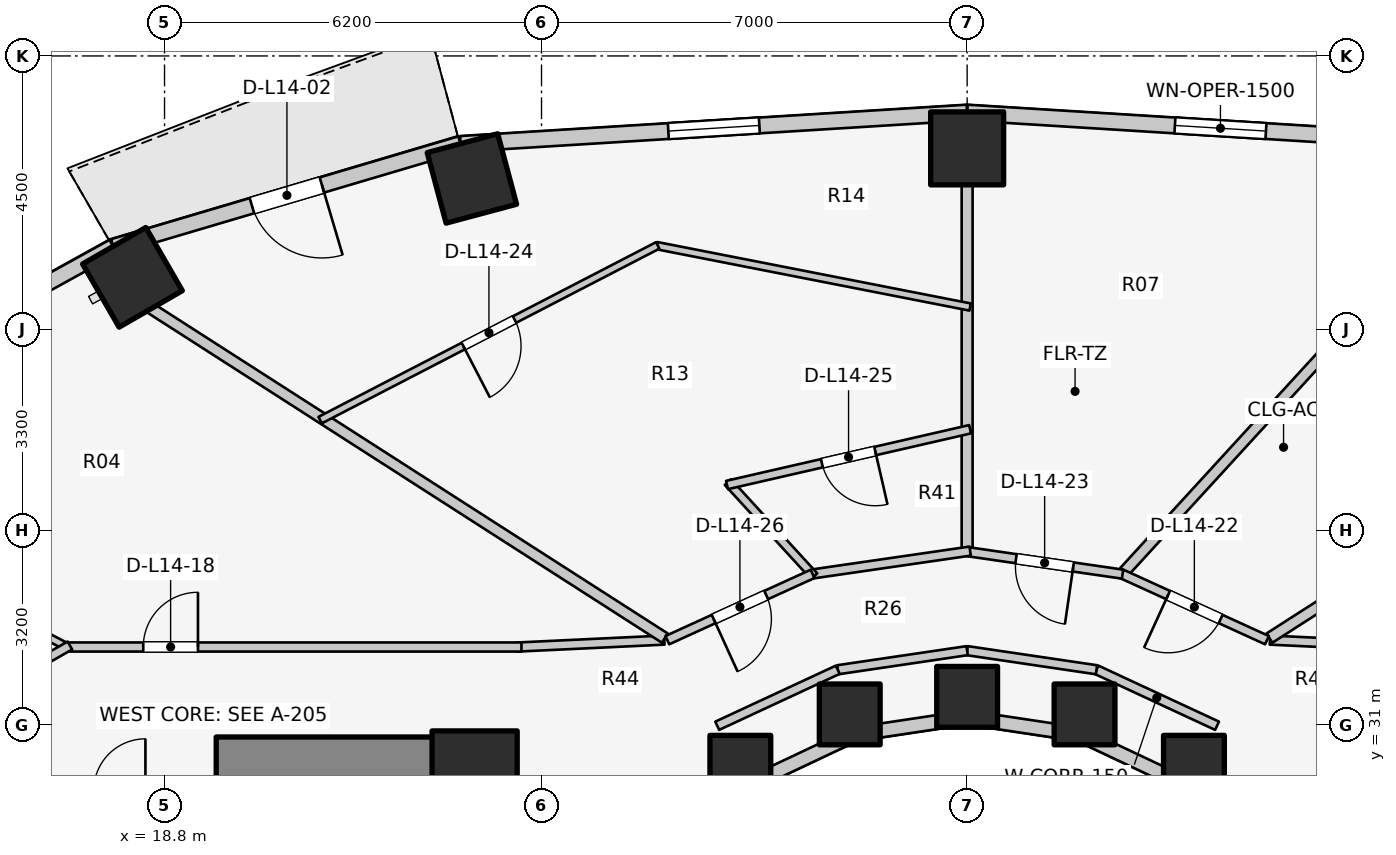
"""IFC4 building model, lengths in metres.
Left out: names, types, materials, properties, quantities, classifications, styles, units other than length and angle.
Written with IfcOpenShell. Run it as: python <this file> out.ifc"""

import sys

from ifc_helpers import new_model, si_unit, direction, frame, frame_2d, origin, origin_2d, place, context, subcontext, project, spatial, rectangle, extrude, element, fill, save


model = new_model("IFC4")
c1 = context("Model", 3, precision=1e-05, world=origin(), true_north=direction((0.0, 1.0)))
c2 = subcontext(c1, "Body", "Model", "MODEL_VIEW")
j1 = project(units=[si_unit("LENGTHUNIT", "METRE"), si_unit("PLANEANGLEUNIT", "RADIAN")], contexts=[c1])
p1 = place(None, origin())
s1 = spatial("IfcSite", under=j1, at=p1, CompositionType="ELEMENT")
p2 = place(p1, origin())
s2 = spatial("IfcBuilding", under=s1, at=p2, CompositionType="ELEMENT")
p3 = place(p2, frame((0.0, 0.0, 49.3)))
s3 = spatial("IfcBuildingStorey", under=s2, at=p3, CompositionType="ELEMENT", Elevation=49.3)
p4 = place(p3, frame((19.65, 30.35, 0.0), z_axis=(0.0, 0.0, 1.0), x_axis=(1.0, 0.0, 0.0)))
e1 = element("IfcWall", 1, at=p4, inside=s3, PredefinedType="SHEAR", context=c2, shape_type="SweptSolid", body=[
    extrude(rectangle(XDim=4.5, YDim=0.9, at=frame_2d((2.25, 0.0))), origin(), (0.0, 0.0, 1.0), 3.1),
])
p5 = place(p3, frame((23.9, 30.2, 0.0), z_axis=(0.0, 0.0, 1.0), x_axis=(1.0, 0.0, 0.0)))
e2 = element("IfcColumn", 2, at=p5, inside=s3, PredefinedType="COLUMN", context=c2, shape_type="SweptSolid", body=[
    extrude(rectangle(XDim=1.4, YDim=1.4, at=origin_2d()), origin(), (0.0, 0.0, 1.0), 3.1),
])
for number, where, z_axis, x_axis in (
    (3, (35.73, 30.327, 0.0), (0.0, 0.0, 1.0), (1.0, 0.0, 0.0)),
    (4, (33.931, 31.172, 0.0), (0.0, 0.0, 1.0), (1.0, 0.0, 0.0)),
    (5, (32.0, 31.46, 0.0), (0.0, 0.0, 1.0), (1.0, 0.0, 0.0)),
):
    element("IfcColumn", number, at=place(p3, frame(where, z_axis=z_axis, x_axis=x_axis)), inside=s3, PredefinedType="COLUMN", context=c2, shape_type="SweptSolid", body=[
        extrude(rectangle(XDim=1.0, YDim=1.0, at=origin_2d()), origin(), (0.0, 0.0, 1.0), 3.1),
    ])
p6 = place(p3, frame((32.0, 40.48, 0.0), z_axis=(0.0, 0.0, 1.0), x_axis=(0.0, 1.0, 0.0)))
e6 = element("IfcColumn", 6, at=p6, inside=s3, PredefinedType="COLUMN", context=c2, shape_type="SweptSolid", body=[
    extrude(rectangle(XDim=1.2, YDim=1.2, at=origin_2d()), origin(), (0.0, 0.0, 1.0), 3.1),
])
p7 = place(p3, frame((30.069, 31.172, 0.0), z_axis=(0.0, 0.0, 1.0), x_axis=(1.0, 0.0, 0.0)))
e7 = element("IfcColumn", 7, at=p7, inside=s3, PredefinedType="COLUMN", context=c2, shape_type="SweptSolid", body=[
    extrude(rectangle(XDim=1.0, YDim=1.0, at=origin_2d()), origin(), (0.0, 0.0, 1.0), 3.1),
])
p8 = place(p3, frame((23.855, 39.986, 0.0), z_axis=(0.0, 0.0, 1.0), x_axis=(-0.258819045103, 0.965925826289, 0.0)))
e8 = element("IfcColumn", 8, at=p8, inside=s3, PredefinedType="COLUMN", context=c2, shape_type="SweptSolid", body=[
    extrude(rectangle(XDim=1.2, YDim=1.2, at=origin_2d()), origin(), (0.0, 0.0, 1.0), 3.1),
])
p9 = place(p3, frame((28.27, 30.327, 0.0), z_axis=(0.0, 0.0, 1.0), x_axis=(1.0, 0.0, 0.0)))
e9 = element("IfcColumn", 9, at=p9, inside=s3, PredefinedType="COLUMN", context=c2, shape_type="SweptSolid", body=[
    extrude(rectangle(XDim=1.0, YDim=1.0, at=origin_2d()), origin(), (0.0, 0.0, 1.0), 3.1),
])
p10 = place(p3, frame((18.273, 38.359, 0.0), z_axis=(0.0, 0.0, 1.0), x_axis=(-0.5, 0.866025403784, 0.0)))
e10 = element("IfcColumn", 10, at=p10, inside=s3, PredefinedType="COLUMN", context=c2, shape_type="SweptSolid", body=[
    extrude(rectangle(XDim=1.2, YDim=1.2, at=origin_2d()), origin(), (0.0, 0.0, 1.0), 3.1),
])
p11 = place(p3, frame((35.56, 30.032, 0.0), z_axis=(0.0, 0.0, 1.0), x_axis=(-0.904179699603, 0.427152280606, 0.0)))
e11 = element("IfcWall", 11, at=p11, inside=s3, PredefinedType="STANDARD", context=c2, shape_type="SweptSolid", body=[
    extrude(rectangle(XDim=1.899, YDim=0.23, at=frame_2d((0.95, 0.0))), origin(), (0.0, 0.0, 1.0), 2.16),
])
for number, where, z_axis, x_axis in (
    (12, (33.843, 30.843, 0.0), (0.0, 0.0, 1.0), (-0.989, 0.149, 0.0)),
    (13, (32.0, 31.12, 0.0), (0.0, 0.0, 1.0), (-0.989, -0.149, 0.0)),
):
    element("IfcWall", number, at=place(p3, frame(where, z_axis=z_axis, x_axis=x_axis)), inside=s3, PredefinedType="STANDARD", context=c2, shape_type="SweptSolid", body=[
        extrude(rectangle(XDim=1.864, YDim=0.23, at=frame_2d((0.932, 0.0))), origin(), (0.0, 0.0, 1.0), 2.16),
    ])
p12 = place(p3, frame((30.157, 30.843, 0.0), z_axis=(0.0, 0.0, 1.0), x_axis=(-0.904179699603, -0.427152280606, 0.0)))
e14 = element("IfcWall", 14, at=p12, inside=s3, PredefinedType="STANDARD", context=c2, shape_type="SweptSolid", body=[
    extrude(rectangle(XDim=1.899, YDim=0.23, at=frame_2d((0.95, 0.0))), origin(), (0.0, 0.0, 1.0), 2.16),
])
p13 = place(p3, frame((40.332, 40.553, 0.0), z_axis=(0.0, 0.0, 1.0), x_axis=(-0.998090514779, 0.061768311519, 0.0)))
e15 = element("IfcWall", 15, at=p13, inside=s3, PredefinedType="STANDARD", context=c2, shape_type="SweptSolid", body=[
    extrude(rectangle(XDim=8.348, YDim=0.26, at=frame_2d((4.174, 0.0))), origin(), (0.0, 0.0, 1.0), 2.85),
])
p14 = place(p13, frame((3.424, 0.0, 0.75)))
e16 = element("IfcOpeningElement", 16, at=p14, cuts=e15, PredefinedType="OPENING", context=c2, shape_type="SweptSolid", body=[
    extrude(rectangle(XDim=1.5, YDim=1.6, at=frame_2d((0.75, 0.8))), frame((0.0, 0.14, 0.0), z_axis=(0.0, -1.0, 0.0), x_axis=(1.0, 0.0, 0.0)), (0.0, 0.0, 1.0), 0.28),
])
p15 = place(p3, frame((32.0, 41.069, 0.0), z_axis=(0.0, 0.0, 1.0), x_axis=(-0.998090514779, -0.061768311519, 0.0)))
e17 = element("IfcWall", 17, at=p15, inside=s3, PredefinedType="STANDARD", context=c2, shape_type="SweptSolid", body=[
    extrude(rectangle(XDim=8.348, YDim=0.26, at=frame_2d((4.174, 0.0))), origin(), (0.0, 0.0, 1.0), 2.85),
])
p16 = place(p15, frame((3.424, 0.0, 0.75)))
e18 = element("IfcOpeningElement", 18, at=p16, cuts=e17, PredefinedType="OPENING", context=c2, shape_type="SweptSolid", body=[
    extrude(rectangle(XDim=1.5, YDim=1.6, at=frame_2d((0.75, 0.8))), frame((0.0, 0.14, 0.0), z_axis=(0.0, -1.0, 0.0), x_axis=(1.0, 0.0, 0.0)), (0.0, 0.0, 1.0), 0.28),
])
p17 = place(p3, frame((23.668, 40.553, 0.0), z_axis=(0.0, 0.0, 1.0), x_axis=(-0.958843593522, -0.283934786811, 0.0)))
e19 = element("IfcWall", 19, at=p17, inside=s3, PredefinedType="STANDARD", context=c2, shape_type="SweptSolid", body=[
    extrude(rectangle(XDim=5.955, YDim=0.26, at=frame_2d((2.978, 0.0))), origin(), (0.0, 0.0, 1.0), 2.88),
])
p18 = place(p17, frame((2.378, 0.0, 0.0)))
e20 = element("IfcOpeningElement", 20, at=p18, cuts=e19, PredefinedType="OPENING", context=c2, shape_type="SweptSolid", body=[
    extrude(rectangle(XDim=1.2, YDim=2.2, at=frame_2d((0.6, 1.1))), frame((0.0, 0.14, 0.0), z_axis=(0.0, -1.0, 0.0), x_axis=(1.0, 0.0, 0.0)), (0.0, 0.0, 1.0), 0.28),
])
p19 = place(p3, frame((17.958, 38.862, 0.0), z_axis=(0.0, 0.0, 1.0), x_axis=(-0.875137303239, -0.483874674352, 0.0)))
e21 = element("IfcWall", 21, at=p19, inside=s3, PredefinedType="STANDARD", context=c2, shape_type="SweptSolid", body=[
    extrude(rectangle(XDim=4.985, YDim=0.26, at=frame_2d((2.493, 0.0))), origin(), (0.0, 0.0, 1.0), 2.85),
])
p20 = place(p3, frame((36.11, 30.985, 0.0), z_axis=(0.0, 0.0, 1.0), x_axis=(-0.906943449489, 0.421252393975, 0.0)))
e22 = element("IfcWall", 22, at=p20, inside=s3, PredefinedType="PARTITIONING", context=c2, shape_type="SweptSolid", body=[
    extrude(rectangle(XDim=2.186, YDim=0.15, at=frame_2d((1.093, 0.0))), origin(), (0.0, 0.0, 1.0), 2.237),
])
for number, where, z_axis, x_axis in (
    (23, (34.127, 31.906, 0.0), (0.0, 0.0, 1.0), (-0.989, 0.146, 0.0)),
    (24, (32.0, 32.22, 0.0), (0.0, 0.0, 1.0), (-0.989, -0.146, 0.0)),
):
    element("IfcWall", number, at=place(p3, frame(where, z_axis=z_axis, x_axis=x_axis)), inside=s3, PredefinedType="PARTITIONING", context=c2, shape_type="SweptSolid", body=[
        extrude(rectangle(XDim=2.151, YDim=0.15, at=frame_2d((1.075, 0.0))), origin(), (0.0, 0.0, 1.0), 2.237),
    ])
p21 = place(p3, frame((29.873, 31.906, 0.0), z_axis=(0.0, 0.0, 1.0), x_axis=(-0.906943449489, -0.421252393975, 0.0)))
e25 = element("IfcWall", 25, at=p21, inside=s3, PredefinedType="PARTITIONING", context=c2, shape_type="SweptSolid", body=[
    extrude(rectangle(XDim=2.186, YDim=0.15, at=frame_2d((1.093, 0.0))), origin(), (0.0, 0.0, 1.0), 2.237),
])
p22 = place(p3, frame((36.98, 32.394, 0.0), z_axis=(0.0, 0.0, 1.0), x_axis=(0.998877427952, -0.047369651964, 0.0)))
e26 = element("IfcWall", 26, at=p22, inside=s3, PredefinedType="PARTITIONING", context=c2, shape_type="SweptSolid", body=[
    extrude(rectangle(XDim=2.433, YDim=0.15, at=frame_2d((1.216, 0.0))), origin(), (0.0, 0.0, 1.0), 2.237),
])
p23 = place(p3, frame((17.244, 32.257, 0.0), z_axis=(0.0, 0.0, 1.0), x_axis=(-0.885586030676, 0.464475383924, 0.0)))
e27 = element("IfcWall", 27, at=p23, inside=s3, PredefinedType="MOVABLE", context=c2, shape_type="SweptSolid", body=[
    extrude(rectangle(XDim=2.376, YDim=0.12, at=frame_2d((1.188, 0.0))), origin(), (0.0, 0.0, 1.0), 2.855),
])
p24 = place(p3, frame((27.02, 32.394, 0.0), z_axis=(0.0, 0.0, 1.0), x_axis=(-0.998877427952, -0.047369651964, 0.0)))
e28 = element("IfcWall", 28, at=p24, inside=s3, PredefinedType="PARTITIONING", context=c2, shape_type="SweptSolid", body=[
    extrude(rectangle(XDim=2.433, YDim=0.15, at=frame_2d((1.216, 0.0))), origin(), (0.0, 0.0, 1.0), 2.237),
])
p25 = place(p3, frame((17.15, 32.28, 0.0), z_axis=(0.0, 0.0, 1.0), x_axis=(1.0, 0.0, 0.0)))
e29 = element("IfcWall", 29, at=p25, inside=s3, PredefinedType="PARTITIONING", context=c2, shape_type="SweptSolid", body=[
    extrude(rectangle(XDim=7.52, YDim=0.15, at=frame_2d((3.76, 0.0))), origin(), (0.0, 0.0, 1.0), 2.237),
])
p26 = place(p25, frame((1.3, 0.0, 0.0)))
e30 = element("IfcOpeningElement", 30, at=p26, cuts=e29, PredefinedType="OPENING", context=c2, shape_type="SweptSolid", body=[
    extrude(rectangle(XDim=0.9, YDim=2.1, at=frame_2d((0.45, 1.05))), frame((0.0, 0.085, 0.0), z_axis=(0.0, -1.0, 0.0), x_axis=(1.0, 0.0, 0.0)), (0.0, 0.0, 1.0), 0.17),
])
p27 = place(p3, frame((17.243, 32.305, 0.0), z_axis=(0.0, 0.0, 1.0), x_axis=(-0.867991349648, -0.496579315857, 0.0)))
e31 = element("IfcWall", 31, at=p27, inside=s3, PredefinedType="PARTITIONING", context=c2, shape_type="SweptSolid", body=[
    extrude(rectangle(XDim=2.567, YDim=0.15, at=frame_2d((1.283, 0.0))), origin(), (0.0, 0.0, 1.0), 2.069),
])
p28 = place(p3, frame((36.971, 32.426, 0.0), z_axis=(0.0, 0.0, 1.0), x_axis=(0.841689919529, 0.5399611832, 0.0)))
e32 = element("IfcWall", 32, at=p28, inside=s3, PredefinedType="PARTITIONING", context=c2, shape_type="SweptSolid", body=[
    extrude(rectangle(XDim=10.058, YDim=0.18, at=frame_2d((5.029, 0.0))), origin(), (0.0, 0.0, 1.0), 2.237),
])
p29 = place(p3, frame((34.586, 33.521, 0.0), z_axis=(0.0, 0.0, 1.0), x_axis=(0.675465011224, 0.737392038615, 0.0)))
e33 = element("IfcWall", 33, at=p29, inside=s3, PredefinedType="PARTITIONING", context=c2, shape_type="SweptSolid", body=[
    extrude(rectangle(XDim=8.007, YDim=0.18, at=frame_2d((4.003, 0.0))), origin(), (0.0, 0.0, 1.0), 2.237),
])
p30 = place(p3, frame((32.0, 33.905, 0.0), z_axis=(0.0, 0.0, 1.0), x_axis=(0.0, 1.0, 0.0)))
e34 = element("IfcWall", 34, at=p30, inside=s3, PredefinedType="PARTITIONING", context=c2, shape_type="SweptSolid", body=[
    extrude(rectangle(XDim=5.995, YDim=0.18, at=frame_2d((2.998, 0.0))), origin(), (0.0, 0.0, 1.0), 2.237),
])
p31 = place(p3, frame((27.029, 32.426, 0.0), z_axis=(0.0, 0.0, 1.0), x_axis=(-0.841689919529, 0.5399611832, 0.0)))
e35 = element("IfcWall", 35, at=p31, inside=s3, PredefinedType="PARTITIONING", context=c2, shape_type="SweptSolid", body=[
    extrude(rectangle(XDim=10.058, YDim=0.18, at=frame_2d((5.029, 0.0))), origin(), (0.0, 0.0, 1.0), 2.237),
])
p32 = place(p3, frame((36.931, 32.393, 0.0), z_axis=(0.0, 0.0, 1.0), x_axis=(-0.909747571199, 0.415161843982, 0.0)))
e36 = element("IfcWall", 36, at=p32, inside=s3, PredefinedType="PARTITIONING", context=c2, shape_type="SweptSolid", body=[
    extrude(rectangle(XDim=2.625, YDim=0.15, at=frame_2d((1.312, 0.0))), origin(), (0.0, 0.0, 1.0), 2.237),
])
p33 = place(p32, frame((0.838, 0.0, 0.0)))
e37 = element("IfcOpeningElement", 37, at=p33, cuts=e36, PredefinedType="OPENING", context=c2, shape_type="SweptSolid", body=[
    extrude(rectangle(XDim=0.95, YDim=2.1, at=frame_2d((0.475, 1.05))), frame((0.0, 0.085, 0.0), z_axis=(0.0, -1.0, 0.0), x_axis=(1.0, 0.0, 0.0)), (0.0, 0.0, 1.0), 0.17),
])
p34 = place(p3, frame((34.556, 33.478, 0.0), z_axis=(0.0, 0.0, 1.0), x_axis=(-0.989637894688, 0.143585644814, 0.0)))
e38 = element("IfcWall", 38, at=p34, inside=s3, PredefinedType="PARTITIONING", context=c2, shape_type="SweptSolid", body=[
    extrude(rectangle(XDim=2.59, YDim=0.15, at=frame_2d((1.295, 0.0))), origin(), (0.0, 0.0, 1.0), 2.237),
])
p35 = place(p34, frame((0.82, 0.0, 0.0)))
e39 = element("IfcOpeningElement", 39, at=p35, cuts=e38, PredefinedType="OPENING", context=c2, shape_type="SweptSolid", body=[
    extrude(rectangle(XDim=0.95, YDim=2.1, at=frame_2d((0.475, 1.05))), frame((0.0, 0.085, 0.0), z_axis=(0.0, -1.0, 0.0), x_axis=(1.0, 0.0, 0.0)), (0.0, 0.0, 1.0), 0.17),
])
p36 = place(p3, frame((32.049, 37.871, 0.0), z_axis=(0.0, 0.0, 1.0), x_axis=(-0.981343325718, 0.192263561471, 0.0)))
e40 = element("IfcWall", 40, at=p36, inside=s3, PredefinedType="MOVABLE", context=c2, shape_type="SweptSolid", body=[
    extrude(rectangle(XDim=5.255, YDim=0.12, at=frame_2d((2.627, 0.0))), origin(), (0.0, 0.0, 1.0), 2.237),
])
p37 = place(p3, frame((26.911, 38.884, 0.0), z_axis=(0.0, 0.0, 1.0), x_axis=(-0.88815498257, -0.459544042433, 0.0)))
e41 = element("IfcWall", 41, at=p37, inside=s3, PredefinedType="MOVABLE", context=c2, shape_type="SweptSolid", body=[
    extrude(rectangle(XDim=6.251, YDim=0.12, at=frame_2d((3.125, 0.0))), origin(), (0.0, 0.0, 1.0), 2.237),
])
p38 = place(p37, frame((2.65, 0.0, 0.0)))
e42 = element("IfcOpeningElement", 42, at=p38, cuts=e41, PredefinedType="OPENING", context=c2, shape_type="SweptSolid", body=[
    extrude(rectangle(XDim=0.95, YDim=2.1, at=frame_2d((0.475, 1.05))), frame((0.0, 0.07, 0.0), z_axis=(0.0, -1.0, 0.0), x_axis=(1.0, 0.0, 0.0)), (0.0, 0.0, 1.0), 0.14),
])
p39 = place(p3, frame((32.05, 33.857, 0.0), z_axis=(0.0, 0.0, 1.0), x_axis=(-0.989649898776, -0.143502884474, 0.0)))
e43 = element("IfcWall", 43, at=p39, inside=s3, PredefinedType="PARTITIONING", context=c2, shape_type="SweptSolid", body=[
    extrude(rectangle(XDim=2.676, YDim=0.15, at=frame_2d((1.338, 0.0))), origin(), (0.0, 0.0, 1.0), 2.237),
])
p40 = place(p3, frame((29.484, 33.443, 0.0), z_axis=(0.0, 0.0, 1.0), x_axis=(-0.675445566455, 0.737409849918, 0.0)))
e44 = element("IfcWall", 44, at=p40, inside=s3, PredefinedType="PLUMBINGWALL", context=c2, shape_type="SweptSolid", body=[
    extrude(rectangle(XDim=2.1, YDim=0.14, at=frame_2d((1.05, 0.0))), origin(), (0.0, 0.0, 1.0), 2.855),
])
p41 = place(p3, frame((32.049, 35.861, 0.0), z_axis=(0.0, 0.0, 1.0), x_axis=(-0.974672340529, -0.223637717318, 0.0)))
e45 = element("IfcWall", 45, at=p41, inside=s3, PredefinedType="PLUMBINGWALL", context=c2, shape_type="SweptSolid", body=[
    extrude(rectangle(XDim=4.101, YDim=0.14, at=frame_2d((2.051, 0.0))), origin(), (0.0, 0.0, 1.0), 2.237),
])
p42 = place(p41, frame((1.601, 0.0, 0.0)))
e46 = element("IfcOpeningElement", 46, at=p42, cuts=e45, PredefinedType="OPENING", context=c2, shape_type="SweptSolid", body=[
    extrude(rectangle(XDim=0.9, YDim=2.1, at=frame_2d((0.45, 1.05))), frame((0.0, 0.08, 0.0), z_axis=(0.0, -1.0, 0.0), x_axis=(1.0, 0.0, 0.0)), (0.0, 0.0, 1.0), 0.16),
])
p43 = place(p3, frame((29.457, 33.482, 0.0), z_axis=(0.0, 0.0, 1.0), x_axis=(-0.909747571199, -0.415161843982, 0.0)))
e47 = element("IfcWall", 47, at=p43, inside=s3, PredefinedType="PARTITIONING", context=c2, shape_type="SweptSolid", body=[
    extrude(rectangle(XDim=2.625, YDim=0.15, at=frame_2d((1.312, 0.0))), origin(), (0.0, 0.0, 1.0), 2.237),
])
p44 = place(p43, frame((0.838, 0.0, 0.0)))
e48 = element("IfcOpeningElement", 48, at=p44, cuts=e47, PredefinedType="OPENING", context=c2, shape_type="SweptSolid", body=[
    extrude(rectangle(XDim=0.95, YDim=2.1, at=frame_2d((0.475, 1.05))), frame((0.0, 0.085, 0.0), z_axis=(0.0, -1.0, 0.0), x_axis=(1.0, 0.0, 0.0)), (0.0, 0.0, 1.0), 0.17),
])
p45 = place(p14, origin())
e49 = element("IfcWindow", 49, at=p45, inside=s3, PartitioningType="SINGLE_PANEL", PredefinedType="WINDOW", context=c2, shape_type="SweptSolid", body=[
    extrude(rectangle(XDim=1.5, YDim=1.6, at=frame_2d((0.75, 0.8))), frame((0.0, 0.03, 0.0), z_axis=(0.0, -1.0, 0.0), x_axis=(1.0, 0.0, 0.0)), (0.0, 0.0, 1.0), 0.06),
])
fill(e16, e49)
p46 = place(p16, origin())
e50 = element("IfcWindow", 50, at=p46, inside=s3, PartitioningType="SINGLE_PANEL", PredefinedType="WINDOW", context=c2, shape_type="SweptSolid", body=[
    extrude(rectangle(XDim=1.5, YDim=1.6, at=frame_2d((0.75, 0.8))), frame((0.0, 0.03, 0.0), z_axis=(0.0, -1.0, 0.0), x_axis=(1.0, 0.0, 0.0)), (0.0, 0.0, 1.0), 0.06),
])
fill(e18, e50)
p47 = place(p18, origin())
e51 = element("IfcDoor", 51, at=p47, inside=s3, OperationType="SINGLE_SWING_LEFT", PredefinedType="DOOR", context=c2, shape_type="SweptSolid", body=[
    extrude(rectangle(XDim=1.2, YDim=2.2, at=frame_2d((0.6, 1.1))), frame((0.0, 0.025, 0.0), z_axis=(0.0, -1.0, 0.0), x_axis=(1.0, 0.0, 0.0)), (0.0, 0.0, 1.0), 0.05),
])
fill(e20, e51)
p48 = place(p26, origin())
e52 = element("IfcDoor", 52, at=p48, inside=s3, OperationType="SINGLE_SWING_RIGHT", PredefinedType="DOOR", context=c2, shape_type="SweptSolid", body=[
    extrude(rectangle(XDim=0.9, YDim=2.1, at=frame_2d((0.45, 1.05))), frame((0.0, 0.025, 0.0), z_axis=(0.0, -1.0, 0.0), x_axis=(1.0, 0.0, 0.0)), (0.0, 0.0, 1.0), 0.05),
])
fill(e30, e52)
p49 = place(p33, origin())
e53 = element("IfcDoor", 53, at=p49, inside=s3, OperationType="SINGLE_SWING_RIGHT", PredefinedType="DOOR", context=c2, shape_type="SweptSolid", body=[
    extrude(rectangle(XDim=0.95, YDim=2.1, at=frame_2d((0.475, 1.05))), frame((0.0, 0.025, 0.0), z_axis=(0.0, -1.0, 0.0), x_axis=(1.0, 0.0, 0.0)), (0.0, 0.0, 1.0), 0.05),
])
fill(e37, e53)
p50 = place(p35, origin())
e54 = element("IfcDoor", 54, at=p50, inside=s3, OperationType="SINGLE_SWING_LEFT", PredefinedType="DOOR", context=c2, shape_type="SweptSolid", body=[
    extrude(rectangle(XDim=0.95, YDim=2.1, at=frame_2d((0.475, 1.05))), frame((0.0, 0.025, 0.0), z_axis=(0.0, -1.0, 0.0), x_axis=(1.0, 0.0, 0.0)), (0.0, 0.0, 1.0), 0.05),
])
fill(e39, e54)
p51 = place(p38, origin())
e55 = element("IfcDoor", 55, at=p51, inside=s3, OperationType="SINGLE_SWING_RIGHT", PredefinedType="DOOR", context=c2, shape_type="SweptSolid", body=[
    extrude(rectangle(XDim=0.95, YDim=2.1, at=frame_2d((0.475, 1.05))), frame((0.0, 0.025, 0.0), z_axis=(0.0, -1.0, 0.0), x_axis=(1.0, 0.0, 0.0)), (0.0, 0.0, 1.0), 0.05),
])
fill(e42, e55)
p52 = place(p42, origin())
e56 = element("IfcDoor", 56, at=p52, inside=s3, OperationType="SINGLE_SWING_LEFT", PredefinedType="DOOR", context=c2, shape_type="SweptSolid", body=[
    extrude(rectangle(XDim=0.9, YDim=2.1, at=frame_2d((0.45, 1.05))), frame((0.0, 0.025, 0.0), z_axis=(0.0, -1.0, 0.0), x_axis=(1.0, 0.0, 0.0)), (0.0, 0.0, 1.0), 0.05),
])
fill(e46, e56)
p53 = place(p44, origin())
e57 = element("IfcDoor", 57, at=p53, inside=s3, OperationType="SINGLE_SWING_RIGHT", PredefinedType="DOOR", context=c2, shape_type="SweptSolid", body=[
    extrude(rectangle(XDim=0.95, YDim=2.1, at=frame_2d((0.475, 1.05))), frame((0.0, 0.025, 0.0), z_axis=(0.0, -1.0, 0.0), x_axis=(1.0, 0.0, 0.0)), (0.0, 0.0, 1.0), 0.05),
])
fill(e48, e57)
save(model, sys.argv[1])
